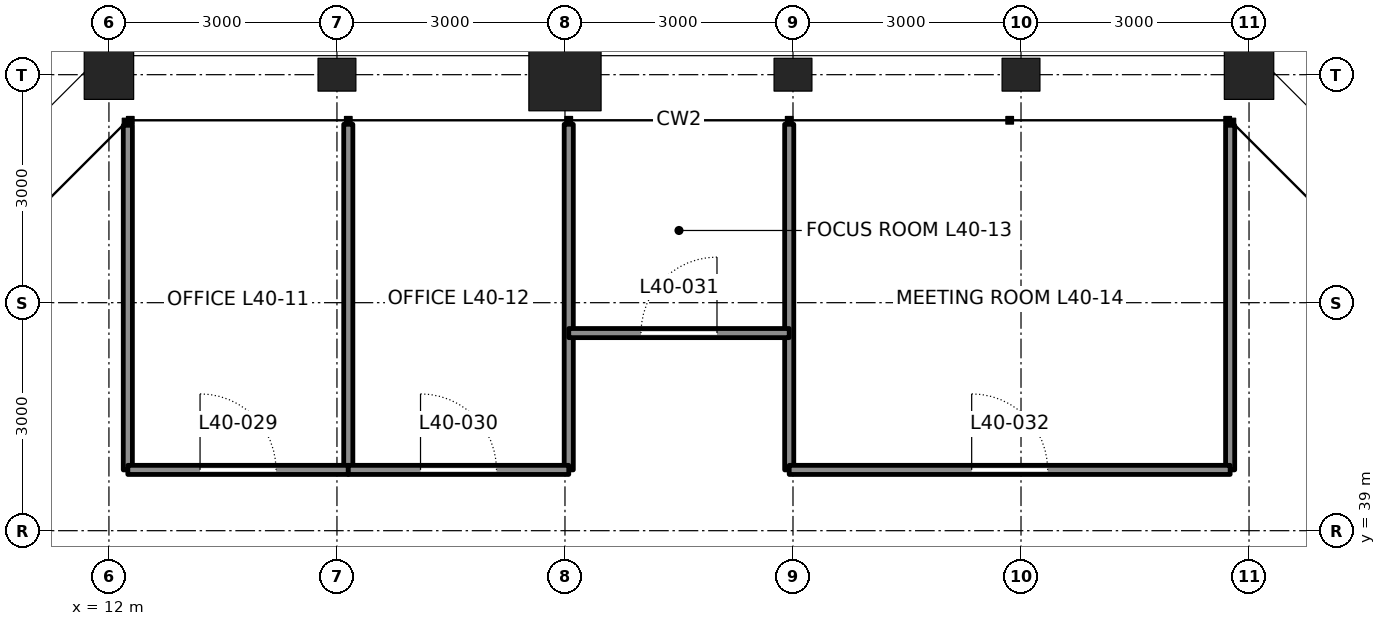
"""IFC4 building model, lengths in metres.
Left out: names, types, materials, properties, quantities, classifications, styles, units other than length and angle.
Written with IfcOpenShell. Run it as: python <this file> out.ifc"""

import sys

from ifc_helpers import new_model, si_unit, direction, frame, frame_2d, origin, origin_2d, place, context, subcontext, project, spatial, rectangle, hollow_rectangle, i_section, extrude, element, fill, save


model = new_model("IFC4")
c1 = context("Model", 3, precision=1e-05, world=origin(), true_north=direction((0.0, 1.0)))
c2 = subcontext(c1, "Body", "Model", "MODEL_VIEW")
j1 = project(units=[si_unit("LENGTHUNIT", "METRE"), si_unit("PLANEANGLEUNIT", "RADIAN")], contexts=[c1])
p1 = place(None, origin())
s1 = spatial("IfcSite", under=j1, at=p1, CompositionType="ELEMENT")
p2 = place(p1, origin())
s2 = spatial("IfcBuilding", under=s1, at=p2, CompositionType="ELEMENT")
p3 = place(p2, frame((0.0, 0.0, 184.5)))
s3 = spatial("IfcBuildingStorey", under=s2, at=p3, CompositionType="ELEMENT", Elevation=184.5)
p4 = place(p3, frame((27.0, 45.0, 0.0), z_axis=(0.0, 0.0, 1.0), x_axis=(0.0, 1.0, 0.0)))
e1 = element("IfcColumn", 1, at=p4, inside=s3, PredefinedType="COLUMN", context=c2, shape_type="SweptSolid", body=[
    extrude(hollow_rectangle(XDim=0.65, YDim=0.65, WallThickness=0.065, at=origin_2d()), origin(), (0.0, 0.0, 1.0), 4.2),
])
for number, where, z_axis, x_axis in (
    (2, (24.0, 45.0, 0.0), (0.0, 0.0, 1.0), (0.0, 1.0, 0.0)),
    (3, (21.0, 45.0, 0.0), (0.0, 0.0, 1.0), (0.0, 1.0, 0.0)),
):
    element("IfcColumn", number, at=place(p3, frame(where, z_axis=z_axis, x_axis=x_axis)), inside=s3, PredefinedType="COLUMN", context=c2, shape_type="SweptSolid", body=[
        extrude(i_section(OverallWidth=0.432, OverallDepth=0.498, WebThickness=0.056, FlangeThickness=0.089, at=origin_2d()), origin(), (0.0, 0.0, 1.0), 4.2),
    ])
p5 = place(p3, frame((18.0, 45.0, 0.0), z_axis=(0.0, 0.0, 1.0), x_axis=(0.0, 1.0, 0.0)))
e4 = element("IfcColumn", 4, at=p5, inside=s3, PredefinedType="COLUMN", context=c2, shape_type="SweptSolid", body=[
    extrude(hollow_rectangle(XDim=0.95, YDim=0.95, WallThickness=0.11, at=origin_2d()), origin(), (0.0, 0.0, 1.0), 4.2),
])
p6 = place(p3, frame((15.0, 45.0, 0.0), z_axis=(0.0, 0.0, 1.0), x_axis=(0.0, 1.0, 0.0)))
e5 = element("IfcColumn", 5, at=p6, inside=s3, PredefinedType="COLUMN", context=c2, shape_type="SweptSolid", body=[
    extrude(i_section(OverallWidth=0.432, OverallDepth=0.498, WebThickness=0.056, FlangeThickness=0.089, at=origin_2d()), origin(), (0.0, 0.0, 1.0), 4.2),
])
p7 = place(p3, frame((12.0, 45.0, 0.0), z_axis=(0.0, 0.0, 1.0), x_axis=(0.0, 1.0, 0.0)))
e6 = element("IfcColumn", 6, at=p7, inside=s3, PredefinedType="COLUMN", context=c2, shape_type="SweptSolid", body=[
    extrude(hollow_rectangle(XDim=0.65, YDim=0.65, WallThickness=0.065, at=origin_2d()), origin(), (0.0, 0.0, 1.0), 4.2),
])
p8 = place(p3, frame((12.249, 44.334, 0.0), z_axis=(0.0, 0.0, 1.0), x_axis=(0.0, -1.0, 0.0)))
e7 = element("IfcWall", 7, at=p8, inside=s3, PredefinedType="PARTITIONING", context=c2, shape_type="SweptSolid", body=[
    extrude(rectangle(XDim=4.534, YDim=0.12, at=frame_2d((2.267, 0.0))), origin(), (0.0, 0.0, 1.0), 4.04),
])
p9 = place(p3, frame((15.149, 44.347, 0.0), z_axis=(0.0, 0.0, 1.0), x_axis=(0.0, -1.0, 0.0)))
e8 = element("IfcWall", 8, at=p9, inside=s3, PredefinedType="PARTITIONING", context=c2, shape_type="SweptSolid", body=[
    extrude(rectangle(XDim=4.547, YDim=0.12, at=frame_2d((2.274, 0.0))), origin(), (0.0, 0.0, 1.0), 4.04),
])
for number, where, z_axis, x_axis in (
    (9, (18.05, 44.347, 0.0), (0.0, 0.0, 1.0), (0.0, -1.0, 0.0)),
    (10, (20.95, 44.347, 0.0), (0.0, 0.0, 1.0), (0.0, -1.0, 0.0)),
):
    element("IfcWall", number, at=place(p3, frame(where, z_axis=z_axis, x_axis=x_axis)), inside=s3, PredefinedType="PARTITIONING", context=c2, shape_type="SweptSolid", body=[
        extrude(rectangle(XDim=4.547, YDim=0.12, at=frame_2d((2.274, 0.0))), origin(), (0.0, 0.0, 1.0), 3.357),
    ])
p10 = place(p3, frame((26.751, 44.334, 0.0), z_axis=(0.0, 0.0, 1.0), x_axis=(0.0, -1.0, 0.0)))
e11 = element("IfcWall", 11, at=p10, inside=s3, PredefinedType="PARTITIONING", context=c2, shape_type="SweptSolid", body=[
    extrude(rectangle(XDim=4.534, YDim=0.12, at=frame_2d((2.267, 0.0))), origin(), (0.0, 0.0, 1.0), 4.04),
])
p11 = place(p3, frame((12.249, 39.8, 0.0), z_axis=(0.0, 0.0, 1.0), x_axis=(1.0, 0.0, 0.0)))
e12 = element("IfcWall", 12, at=p11, inside=s3, PredefinedType="PARTITIONING", context=c2, shape_type="SweptSolid", body=[
    extrude(rectangle(XDim=2.901, YDim=0.12, at=frame_2d((1.45, 0.0))), origin(), (0.0, 0.0, 1.0), 4.04),
])
p12 = place(p11, frame((0.95, 0.0, 0.0)))
e13 = element("IfcOpeningElement", 13, at=p12, cuts=e12, PredefinedType="OPENING", context=c2, shape_type="SweptSolid", body=[
    extrude(rectangle(XDim=1.0, YDim=2.4, at=frame_2d((0.5, 1.2))), frame((0.0, 0.07, 0.0), z_axis=(0.0, -1.0, 0.0), x_axis=(1.0, 0.0, 0.0)), (0.0, 0.0, 1.0), 0.14),
])
p13 = place(p3, frame((15.149, 39.8, 0.0), z_axis=(0.0, 0.0, 1.0), x_axis=(1.0, 0.0, 0.0)))
e14 = element("IfcWall", 14, at=p13, inside=s3, PredefinedType="PARTITIONING", context=c2, shape_type="SweptSolid", body=[
    extrude(rectangle(XDim=2.901, YDim=0.12, at=frame_2d((1.45, 0.0))), origin(), (0.0, 0.0, 1.0), 4.04),
])
p14 = place(p13, frame((0.95, 0.0, 0.0)))
e15 = element("IfcOpeningElement", 15, at=p14, cuts=e14, PredefinedType="OPENING", context=c2, shape_type="SweptSolid", body=[
    extrude(rectangle(XDim=1.0, YDim=2.4, at=frame_2d((0.5, 1.2))), frame((0.0, 0.07, 0.0), z_axis=(0.0, -1.0, 0.0), x_axis=(1.0, 0.0, 0.0)), (0.0, 0.0, 1.0), 0.14),
])
p15 = place(p3, frame((18.05, 41.6, 0.0), z_axis=(0.0, 0.0, 1.0), x_axis=(1.0, 0.0, 0.0)))
e16 = element("IfcWall", 16, at=p15, inside=s3, PredefinedType="PARTITIONING", context=c2, shape_type="SweptSolid", body=[
    extrude(rectangle(XDim=2.9, YDim=0.12, at=frame_2d((1.45, 0.0))), origin(), (0.0, 0.0, 1.0), 4.04),
])
p16 = place(p15, frame((0.95, 0.0, 0.0)))
e17 = element("IfcOpeningElement", 17, at=p16, cuts=e16, PredefinedType="OPENING", context=c2, shape_type="SweptSolid", body=[
    extrude(rectangle(XDim=1.0, YDim=2.4, at=frame_2d((0.5, 1.2))), frame((0.0, 0.07, 0.0), z_axis=(0.0, -1.0, 0.0), x_axis=(1.0, 0.0, 0.0)), (0.0, 0.0, 1.0), 0.14),
])
p17 = place(p3, frame((20.95, 39.8, 0.0), z_axis=(0.0, 0.0, 1.0), x_axis=(1.0, 0.0, 0.0)))
e18 = element("IfcWall", 18, at=p17, inside=s3, PredefinedType="PARTITIONING", context=c2, shape_type="SweptSolid", body=[
    extrude(rectangle(XDim=5.801, YDim=0.12, at=frame_2d((2.901, 0.0))), origin(), (0.0, 0.0, 1.0), 4.04),
])
p18 = place(p17, frame((2.401, 0.0, 0.0)))
e19 = element("IfcOpeningElement", 19, at=p18, cuts=e18, PredefinedType="OPENING", context=c2, shape_type="SweptSolid", body=[
    extrude(rectangle(XDim=1.0, YDim=2.4, at=frame_2d((0.5, 1.2))), frame((0.0, 0.07, 0.0), z_axis=(0.0, -1.0, 0.0), x_axis=(1.0, 0.0, 0.0)), (0.0, 0.0, 1.0), 0.14),
])
p19 = place(p12, origin())
e20 = element("IfcDoor", 20, at=p19, inside=s3, OperationType="SINGLE_SWING_LEFT", PredefinedType="DOOR", context=c2, shape_type="SweptSolid", body=[
    extrude(rectangle(XDim=1.0, YDim=2.4, at=frame_2d((0.5, 1.2))), frame((0.0, 0.025, 0.0), z_axis=(0.0, -1.0, 0.0), x_axis=(1.0, 0.0, 0.0)), (0.0, 0.0, 1.0), 0.05),
])
fill(e13, e20)
p20 = place(p14, origin())
e21 = element("IfcDoor", 21, at=p20, inside=s3, OperationType="SINGLE_SWING_LEFT", PredefinedType="DOOR", context=c2, shape_type="SweptSolid", body=[
    extrude(rectangle(XDim=1.0, YDim=2.4, at=frame_2d((0.5, 1.2))), frame((0.0, 0.025, 0.0), z_axis=(0.0, -1.0, 0.0), x_axis=(1.0, 0.0, 0.0)), (0.0, 0.0, 1.0), 0.05),
])
fill(e15, e21)
p21 = place(p16, origin())
e22 = element("IfcDoor", 22, at=p21, inside=s3, OperationType="SINGLE_SWING_RIGHT", PredefinedType="DOOR", context=c2, shape_type="SweptSolid", body=[
    extrude(rectangle(XDim=1.0, YDim=2.4, at=frame_2d((0.5, 1.2))), frame((0.0, 0.025, 0.0), z_axis=(0.0, -1.0, 0.0), x_axis=(1.0, 0.0, 0.0)), (0.0, 0.0, 1.0), 0.05),
])
fill(e17, e22)
p22 = place(p18, origin())
e23 = element("IfcDoor", 23, at=p22, inside=s3, OperationType="SINGLE_SWING_LEFT", PredefinedType="DOOR", context=c2, shape_type="SweptSolid", body=[
    extrude(rectangle(XDim=1.0, YDim=2.4, at=frame_2d((0.5, 1.2))), frame((0.0, 0.025, 0.0), z_axis=(0.0, -1.0, 0.0), x_axis=(1.0, 0.0, 0.0)), (0.0, 0.0, 1.0), 0.05),
])
fill(e19, e23)
save(model, sys.argv[1])
